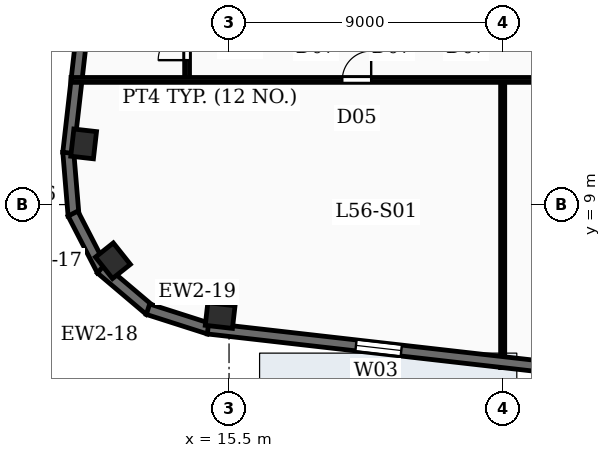
"""IFC4 building model, lengths in metres.
Left out: names, types, materials, properties, quantities, classifications, styles, units other than length and angle.
Written with IfcOpenShell. Run it as: python <this file> out.ifc"""

import sys

from ifc_helpers import new_model, si_unit, direction, frame, frame_2d, origin, origin_2d, place, context, subcontext, project, spatial, rectangle, extrude, element, fill, save


model = new_model("IFC4")
c1 = context("Model", 3, precision=1e-05, world=origin(), true_north=direction((0.0, 1.0)))
c2 = subcontext(c1, "Body", "Model", "MODEL_VIEW")
j1 = project(units=[si_unit("LENGTHUNIT", "METRE"), si_unit("PLANEANGLEUNIT", "RADIAN")], contexts=[c1])
p1 = place(None, origin())
s1 = spatial("IfcSite", under=j1, at=p1, CompositionType="ELEMENT")
p2 = place(p1, origin())
s2 = spatial("IfcBuilding", under=s1, at=p2, CompositionType="ELEMENT")
p3 = place(p2, frame((0.0, 0.0, 232.2)))
s3 = spatial("IfcBuildingStorey", under=s2, at=p3, CompositionType="ELEMENT", Elevation=232.2)
for number, where, z_axis, x_axis in (
    (1, (15.208, 5.351, -0.27), (0.0, 0.0, 1.0), (0.994, -0.113, 0.0)),
    (2, (10.718, 10.995, -0.27), (0.0, 0.0, 1.0), (0.113, 0.994, 0.0)),
    (3, (11.68, 7.153, -0.27), (0.0, 0.0, 1.0), (-0.623, 0.783, 0.0)),
):
    element("IfcColumn", number, at=place(p3, frame(where, z_axis=z_axis, x_axis=x_axis)), inside=s3, PredefinedType="COLUMN", context=c2, shape_type="SweptSolid", body=[
        extrude(rectangle(XDim=0.9, YDim=0.75, at=origin_2d()), origin(), (0.0, 0.0, 1.0), 3.75),
    ])
p4 = place(p3, frame((10.211, 10.701, 0.0), z_axis=(0.0, 0.0, 1.0), x_axis=(0.113203107947, 0.993571867733, 0.0)))
e4 = element("IfcWall", 4, at=p4, inside=s3, PredefinedType="SOLIDWALL", context=c2, shape_type="SweptSolid", body=[
    extrude(rectangle(XDim=34.5, YDim=0.36, at=frame_2d((17.25, 0.0))), origin(), (0.0, 0.0, 1.0), 3.48),
])
p5 = place(p4, frame((4.2, 0.0, 0.88)))
e5 = element("IfcOpeningElement", 5, at=p5, cuts=e4, PredefinedType="OPENING", context=c2, shape_type="SweptSolid", body=[
    extrude(rectangle(XDim=1.35, YDim=2.2, at=frame_2d((0.675, 1.1))), frame((0.0, 0.19, 0.0), z_axis=(0.0, -1.0, 0.0), x_axis=(1.0, 0.0, 0.0)), (0.0, 0.0, 1.0), 0.38),
])
p6 = place(p4, frame((15.4, 0.0, 0.88)))
e6 = element("IfcOpeningElement", 6, at=p6, cuts=e4, PredefinedType="OPENING", context=c2, shape_type="SweptSolid", body=[
    extrude(rectangle(XDim=1.35, YDim=2.2, at=frame_2d((0.675, 1.1))), frame((0.0, 0.19, 0.0), z_axis=(0.0, -1.0, 0.0), x_axis=(1.0, 0.0, 0.0)), (0.0, 0.0, 1.0), 0.38),
])
p7 = place(p4, frame((26.6, 0.0, 0.88)))
e7 = element("IfcOpeningElement", 7, at=p7, cuts=e4, PredefinedType="OPENING", context=c2, shape_type="SweptSolid", body=[
    extrude(rectangle(XDim=1.35, YDim=2.2, at=frame_2d((0.675, 1.1))), frame((0.0, 0.19, 0.0), z_axis=(0.0, -1.0, 0.0), x_axis=(1.0, 0.0, 0.0)), (0.0, 0.0, 1.0), 0.38),
])
p8 = place(p3, frame((10.386, 8.636, 0.0), z_axis=(0.0, 0.0, 1.0), x_axis=(-0.082729038891, 0.996572077737, 0.0)))
e8 = element("IfcWall", 8, at=p8, inside=s3, PredefinedType="SOLIDWALL", context=c2, shape_type="SweptSolid", body=[
    extrude(rectangle(XDim=2.107, YDim=0.36, at=frame_2d((1.054, 0.0))), origin(), (0.0, 0.0, 1.0), 3.48),
])
for number, where, z_axis, x_axis in (
    (9, (11.332, 6.831, 0.0), (0.0, 0.0, 1.0), (-0.458, 0.889, 0.0)),
    (10, (12.896, 5.524, 0.0), (0.0, 0.0, 1.0), (-0.763, 0.646, 0.0)),
    (11, (14.841, 4.916, 0.0), (0.0, 0.0, 1.0), (-0.952, 0.305, 0.0)),
):
    element("IfcWall", number, at=place(p3, frame(where, z_axis=z_axis, x_axis=x_axis)), inside=s3, PredefinedType="SOLIDWALL", context=c2, shape_type="SweptSolid", body=[
        extrude(rectangle(XDim=2.107, YDim=0.36, at=frame_2d((1.053, 0.0))), origin(), (0.0, 0.0, 1.0), 3.48),
    ])
p9 = place(p3, frame((61.306, -0.375, 0.0), z_axis=(0.0, 0.0, 1.0), x_axis=(-0.993571958919, 0.113202307616, 0.0)))
e12 = element("IfcWall", 12, at=p9, inside=s3, PredefinedType="SOLIDWALL", context=c2, shape_type="SweptSolid", body=[
    extrude(rectangle(XDim=46.8, YDim=0.36, at=frame_2d((23.4, 0.0))), origin(), (0.0, 0.0, 1.0), 3.48),
])
p10 = place(p9, frame((2.6, 0.0, 0.88)))
e13 = element("IfcOpeningElement", 13, at=p10, cuts=e12, PredefinedType="OPENING", context=c2, shape_type="SweptSolid", body=[
    extrude(rectangle(XDim=1.5, YDim=2.05, at=frame_2d((0.75, 1.025))), frame((0.0, 0.19, 0.0), z_axis=(0.0, -1.0, 0.0), x_axis=(1.0, 0.0, 0.0)), (0.0, 0.0, 1.0), 0.38),
])
p11 = place(p9, frame((13.4, 0.0, 0.88)))
e14 = element("IfcOpeningElement", 14, at=p11, cuts=e12, PredefinedType="OPENING", context=c2, shape_type="SweptSolid", body=[
    extrude(rectangle(XDim=1.5, YDim=2.05, at=frame_2d((0.75, 1.025))), frame((0.0, 0.19, 0.0), z_axis=(0.0, -1.0, 0.0), x_axis=(1.0, 0.0, 0.0)), (0.0, 0.0, 1.0), 0.38),
])
p12 = place(p9, frame((18.8, 0.0, 0.88)))
e15 = element("IfcOpeningElement", 15, at=p12, cuts=e12, PredefinedType="OPENING", context=c2, shape_type="SweptSolid", body=[
    extrude(rectangle(XDim=1.5, YDim=2.05, at=frame_2d((0.75, 1.025))), frame((0.0, 0.19, 0.0), z_axis=(0.0, -1.0, 0.0), x_axis=(1.0, 0.0, 0.0)), (0.0, 0.0, 1.0), 0.38),
])
p13 = place(p9, frame((40.4, 0.0, 0.88)))
e16 = element("IfcOpeningElement", 16, at=p13, cuts=e12, PredefinedType="OPENING", context=c2, shape_type="SweptSolid", body=[
    extrude(rectangle(XDim=1.5, YDim=2.05, at=frame_2d((0.75, 1.025))), frame((0.0, 0.19, 0.0), z_axis=(0.0, -1.0, 0.0), x_axis=(1.0, 0.0, 0.0)), (0.0, 0.0, 1.0), 0.38),
])
p14 = place(p3, frame((24.5, 3.638, 0.0), z_axis=(0.0, 0.0, 1.0), x_axis=(0.0, 1.0, 0.0)))
e17 = element("IfcWall", 17, at=p14, inside=s3, PredefinedType="PARTITIONING", context=c2, shape_type="SweptSolid", body=[
    extrude(rectangle(XDim=9.462, YDim=0.135, at=frame_2d((4.731, 0.0))), origin(), (0.0, 0.0, 1.0), 2.54),
])
p15 = place(p3, frame((10.303, 13.1, 0.0), z_axis=(0.0, 0.0, 1.0), x_axis=(1.0, 0.0, 0.0)))
e18 = element("IfcWall", 18, at=p15, inside=s3, PredefinedType="PARTITIONING", context=c2, shape_type="SweptSolid", body=[
    extrude(rectangle(XDim=57.973, YDim=0.16, at=frame_2d((28.986, 0.0))), origin(), (0.0, 0.0, 1.0), 2.54),
])
p16 = place(p15, frame((8.922, 0.0, 0.0)))
e19 = element("IfcOpeningElement", 19, at=p16, cuts=e18, PredefinedType="OPENING", context=c2, shape_type="SweptSolid", body=[
    extrude(rectangle(XDim=0.95, YDim=2.15, at=frame_2d((0.475, 1.075))), frame((0.0, 0.09, 0.0), z_axis=(0.0, -1.0, 0.0), x_axis=(1.0, 0.0, 0.0)), (0.0, 0.0, 1.0), 0.18),
])
p17 = place(p15, frame((17.222, 0.0, 0.0)))
e20 = element("IfcOpeningElement", 20, at=p17, cuts=e18, PredefinedType="OPENING", context=c2, shape_type="SweptSolid", body=[
    extrude(rectangle(XDim=0.95, YDim=2.15, at=frame_2d((0.475, 1.075))), frame((0.0, 0.09, 0.0), z_axis=(0.0, -1.0, 0.0), x_axis=(1.0, 0.0, 0.0)), (0.0, 0.0, 1.0), 0.18),
])
p18 = place(p15, frame((24.222, 0.0, 0.0)))
e21 = element("IfcOpeningElement", 21, at=p18, cuts=e18, PredefinedType="OPENING", context=c2, shape_type="SweptSolid", body=[
    extrude(rectangle(XDim=0.95, YDim=2.15, at=frame_2d((0.475, 1.075))), frame((0.0, 0.09, 0.0), z_axis=(0.0, -1.0, 0.0), x_axis=(1.0, 0.0, 0.0)), (0.0, 0.0, 1.0), 0.18),
])
p19 = place(p15, frame((31.222, 0.0, 0.0)))
e22 = element("IfcOpeningElement", 22, at=p19, cuts=e18, PredefinedType="OPENING", context=c2, shape_type="SweptSolid", body=[
    extrude(rectangle(XDim=0.95, YDim=2.15, at=frame_2d((0.475, 1.075))), frame((0.0, 0.09, 0.0), z_axis=(0.0, -1.0, 0.0), x_axis=(1.0, 0.0, 0.0)), (0.0, 0.0, 1.0), 0.18),
])
p20 = place(p15, frame((37.972, 0.0, 0.0)))
e23 = element("IfcOpeningElement", 23, at=p20, cuts=e18, PredefinedType="OPENING", context=c2, shape_type="SweptSolid", body=[
    extrude(rectangle(XDim=0.95, YDim=2.15, at=frame_2d((0.475, 1.075))), frame((0.0, 0.09, 0.0), z_axis=(0.0, -1.0, 0.0), x_axis=(1.0, 0.0, 0.0)), (0.0, 0.0, 1.0), 0.18),
])
p21 = place(p15, frame((45.222, 0.0, 0.0)))
e24 = element("IfcOpeningElement", 24, at=p21, cuts=e18, PredefinedType="OPENING", context=c2, shape_type="SweptSolid", body=[
    extrude(rectangle(XDim=0.95, YDim=2.15, at=frame_2d((0.475, 1.075))), frame((0.0, 0.09, 0.0), z_axis=(0.0, -1.0, 0.0), x_axis=(1.0, 0.0, 0.0)), (0.0, 0.0, 1.0), 0.18),
])
p22 = place(p3, frame((14.12, 13.1, 0.0), z_axis=(0.0, 0.0, 1.0), x_axis=(0.0, 1.0, 0.0)))
e25 = element("IfcWall", 25, at=p22, inside=s3, PredefinedType="PARTITIONING", context=c2, shape_type="SweptSolid", body=[
    extrude(rectangle(XDim=2.3, YDim=0.16, at=frame_2d((1.15, 0.0))), origin(), (0.0, 0.0, 1.0), 2.54),
])
p23 = place(p22, frame((0.65, 0.0, 0.0)))
e26 = element("IfcOpeningElement", 26, at=p23, cuts=e25, PredefinedType="OPENING", context=c2, shape_type="SweptSolid", body=[
    extrude(rectangle(XDim=0.95, YDim=2.15, at=frame_2d((0.475, 1.075))), frame((0.0, 0.09, 0.0), z_axis=(0.0, -1.0, 0.0), x_axis=(1.0, 0.0, 0.0)), (0.0, 0.0, 1.0), 0.18),
])
p24 = place(p13, origin())
e27 = element("IfcWindow", 27, at=p24, inside=s3, PartitioningType="SINGLE_PANEL", PredefinedType="WINDOW", context=c2, shape_type="SweptSolid", body=[
    extrude(rectangle(XDim=1.5, YDim=2.05, at=frame_2d((0.75, 1.025))), frame((0.0, 0.03, 0.0), z_axis=(0.0, -1.0, 0.0), x_axis=(1.0, 0.0, 0.0)), (0.0, 0.0, 1.0), 0.06),
])
fill(e16, e27)
p25 = place(p16, origin())
e28 = element("IfcDoor", 28, at=p25, inside=s3, OperationType="SINGLE_SWING_RIGHT", PredefinedType="DOOR", context=c2, shape_type="SweptSolid", body=[
    extrude(rectangle(XDim=0.95, YDim=2.15, at=frame_2d((0.475, 1.075))), frame((0.0, 0.025, 0.0), z_axis=(0.0, -1.0, 0.0), x_axis=(1.0, 0.0, 0.0)), (0.0, 0.0, 1.0), 0.05),
])
fill(e19, e28)
p26 = place(p23, origin())
e29 = element("IfcDoor", 29, at=p26, inside=s3, OperationType="SINGLE_SWING_LEFT", PredefinedType="DOOR", context=c2, shape_type="SweptSolid", body=[
    extrude(rectangle(XDim=0.95, YDim=2.15, at=frame_2d((0.475, 1.075))), frame((0.0, 0.025, 0.0), z_axis=(0.0, -1.0, 0.0), x_axis=(1.0, 0.0, 0.0)), (0.0, 0.0, 1.0), 0.05),
])
fill(e26, e29)
save(model, sys.argv[1])
